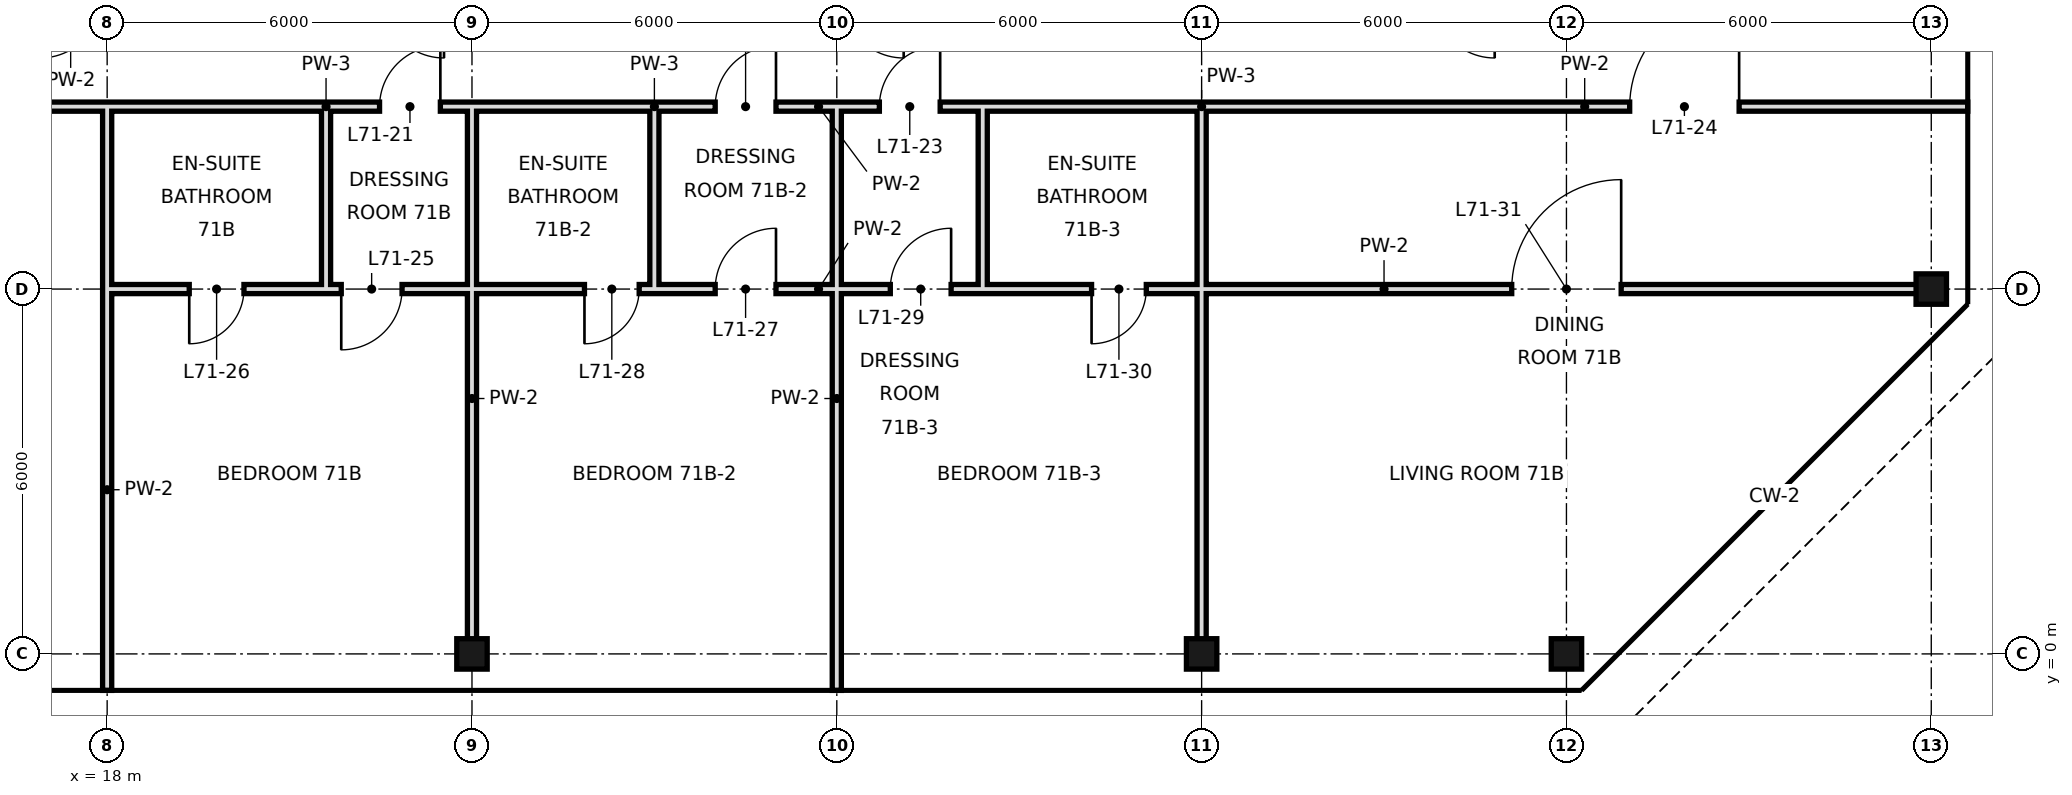
"""IFC4 building model, lengths in metres.
Left out: names, types, materials, properties, quantities, classifications, styles, units other than length and angle.
Written with IfcOpenShell. Run it as: python <this file> out.ifc"""

import sys

from ifc_helpers import new_model, si_unit, direction, frame, frame_2d, origin, origin_2d, place, context, subcontext, project, spatial, rectangle, hollow_rectangle, extrude, element, fill, save


model = new_model("IFC4")
c1 = context("Model", 3, precision=1e-05, world=origin(), true_north=direction((0.0, 1.0)))
c2 = subcontext(c1, "Body", "Model", "MODEL_VIEW")
j1 = project(units=[si_unit("LENGTHUNIT", "METRE"), si_unit("PLANEANGLEUNIT", "RADIAN")], contexts=[c1])
p1 = place(None, origin())
s1 = spatial("IfcSite", under=j1, at=p1, CompositionType="ELEMENT")
p2 = place(p1, origin())
s2 = spatial("IfcBuilding", under=s1, at=p2, CompositionType="ELEMENT")
p3 = place(p2, frame((0.0, 0.0, 301.6)))
s3 = spatial("IfcBuildingStorey", under=s2, at=p3, CompositionType="ELEMENT", Elevation=301.6)
for number, where, z_axis, x_axis in (
    (1, (24.0, 0.0, 0.0), (0.0, 0.0, 1.0), (1.0, 0.0, 0.0)),
    (2, (36.0, 0.0, 0.0), (0.0, 0.0, 1.0), (1.0, 0.0, 0.0)),
    (3, (42.0, 0.0, 0.0), (0.0, 0.0, 1.0), (1.0, 0.0, 0.0)),
    (4, (48.0, 6.0, 0.0), (0.0, 0.0, 1.0), (1.0, 0.0, 0.0)),
):
    element("IfcColumn", number, at=place(p3, frame(where, z_axis=z_axis, x_axis=x_axis)), inside=s3, PredefinedType="COLUMN", context=c2, shape_type="SweptSolid", body=[
        extrude(hollow_rectangle(XDim=0.5, YDim=0.5, WallThickness=0.025, at=origin_2d()), origin(), (0.0, 0.0, 1.0), 3.6),
    ])
p4 = place(p3, frame((18.0, -0.6, 0.0), z_axis=(0.0, 0.0, 1.0), x_axis=(0.0, 1.0, 0.0)))
e5 = element("IfcWall", 5, at=p4, inside=s3, PredefinedType="PARTITIONING", context=c2, shape_type="SweptSolid", body=[
    extrude(rectangle(XDim=6.6, YDim=0.15, at=frame_2d((3.3, 0.0))), origin(), (0.0, 0.0, 1.0), 2.72),
])
p5 = place(p3, frame((18.0, 6.0, 0.0), z_axis=(0.0, 0.0, 1.0), x_axis=(0.0, 1.0, 0.0)))
e6 = element("IfcWall", 6, at=p5, inside=s3, PredefinedType="PARTITIONING", context=c2, shape_type="SweptSolid", body=[
    extrude(rectangle(XDim=3.0, YDim=0.15, at=frame_2d((1.5, 0.0))), origin(), (0.0, 0.0, 1.0), 2.72),
])
p6 = place(p3, frame((21.6, 6.0, 0.0), z_axis=(0.0, 0.0, 1.0), x_axis=(0.0, 1.0, 0.0)))
e7 = element("IfcWall", 7, at=p6, inside=s3, PredefinedType="PARTITIONING", context=c2, shape_type="SweptSolid", body=[
    extrude(rectangle(XDim=3.0, YDim=0.15, at=frame_2d((1.5, 0.0))), origin(), (0.0, 0.0, 1.0), 3.42),
])
p7 = place(p3, frame((24.0, 0.0, 0.0), z_axis=(0.0, 0.0, 1.0), x_axis=(0.0, 1.0, 0.0)))
e8 = element("IfcWall", 8, at=p7, inside=s3, PredefinedType="PARTITIONING", context=c2, shape_type="SweptSolid", body=[
    extrude(rectangle(XDim=6.0, YDim=0.15, at=frame_2d((3.0, 0.0))), origin(), (0.0, 0.0, 1.0), 2.72),
])
p8 = place(p3, frame((24.0, 6.0, 0.0), z_axis=(0.0, 0.0, 1.0), x_axis=(0.0, 1.0, 0.0)))
e9 = element("IfcWall", 9, at=p8, inside=s3, PredefinedType="PARTITIONING", context=c2, shape_type="SweptSolid", body=[
    extrude(rectangle(XDim=3.0, YDim=0.15, at=frame_2d((1.5, 0.0))), origin(), (0.0, 0.0, 1.0), 2.72),
])
p9 = place(p3, frame((27.0, 6.0, 0.0), z_axis=(0.0, 0.0, 1.0), x_axis=(0.0, 1.0, 0.0)))
e10 = element("IfcWall", 10, at=p9, inside=s3, PredefinedType="PARTITIONING", context=c2, shape_type="SweptSolid", body=[
    extrude(rectangle(XDim=3.0, YDim=0.15, at=frame_2d((1.5, 0.0))), origin(), (0.0, 0.0, 1.0), 3.42),
])
p10 = place(p3, frame((30.0, -0.6, 0.0), z_axis=(0.0, 0.0, 1.0), x_axis=(0.0, 1.0, 0.0)))
e11 = element("IfcWall", 11, at=p10, inside=s3, PredefinedType="PARTITIONING", context=c2, shape_type="SweptSolid", body=[
    extrude(rectangle(XDim=9.6, YDim=0.15, at=frame_2d((4.8, 0.0))), origin(), (0.0, 0.0, 1.0), 2.72),
])
p11 = place(p3, frame((32.4, 6.0, 0.0), z_axis=(0.0, 0.0, 1.0), x_axis=(0.0, 1.0, 0.0)))
e12 = element("IfcWall", 12, at=p11, inside=s3, PredefinedType="PARTITIONING", context=c2, shape_type="SweptSolid", body=[
    extrude(rectangle(XDim=3.0, YDim=0.15, at=frame_2d((1.5, 0.0))), origin(), (0.0, 0.0, 1.0), 3.42),
])
p12 = place(p3, frame((36.0, 0.0, 0.0), z_axis=(0.0, 0.0, 1.0), x_axis=(0.0, 1.0, 0.0)))
e13 = element("IfcWall", 13, at=p12, inside=s3, PredefinedType="PARTITIONING", context=c2, shape_type="SweptSolid", body=[
    extrude(rectangle(XDim=6.0, YDim=0.15, at=frame_2d((3.0, 0.0))), origin(), (0.0, 0.0, 1.0), 2.72),
])
p13 = place(p3, frame((36.0, 6.0, 0.0), z_axis=(0.0, 0.0, 1.0), x_axis=(0.0, 1.0, 0.0)))
e14 = element("IfcWall", 14, at=p13, inside=s3, PredefinedType="PARTITIONING", context=c2, shape_type="SweptSolid", body=[
    extrude(rectangle(XDim=3.0, YDim=0.15, at=frame_2d((1.5, 0.0))), origin(), (0.0, 0.0, 1.0), 2.72),
])
p14 = place(p3, frame((21.6, 6.0, 0.0), z_axis=(0.0, 0.0, 1.0), x_axis=(1.0, 0.0, 0.0)))
e15 = element("IfcWall", 15, at=p14, inside=s3, PredefinedType="PARTITIONING", context=c2, shape_type="SweptSolid", body=[
    extrude(rectangle(XDim=2.4, YDim=0.15, at=frame_2d((1.2, 0.0))), origin(), (0.0, 0.0, 1.0), 2.97),
])
p15 = place(p14, frame((0.25, 0.0, 0.0)))
e16 = element("IfcOpeningElement", 16, at=p15, cuts=e15, PredefinedType="OPENING", context=c2, shape_type="SweptSolid", body=[
    extrude(rectangle(XDim=1.0, YDim=2.4, at=frame_2d((0.5, 1.2))), frame((0.0, 0.085, 0.0), z_axis=(0.0, -1.0, 0.0), x_axis=(1.0, 0.0, 0.0)), (0.0, 0.0, 1.0), 0.17),
])
p16 = place(p3, frame((27.0, 6.0, 0.0), z_axis=(0.0, 0.0, 1.0), x_axis=(1.0, 0.0, 0.0)))
e17 = element("IfcWall", 17, at=p16, inside=s3, PredefinedType="PARTITIONING", context=c2, shape_type="SweptSolid", body=[
    extrude(rectangle(XDim=5.4, YDim=0.15, at=frame_2d((2.7, 0.0))), origin(), (0.0, 0.0, 1.0), 2.97),
])
p17 = place(p16, frame((1.0, 0.0, 0.0)))
e18 = element("IfcOpeningElement", 18, at=p17, cuts=e17, PredefinedType="OPENING", context=c2, shape_type="SweptSolid", body=[
    extrude(rectangle(XDim=1.0, YDim=2.4, at=frame_2d((0.5, 1.2))), frame((0.0, 0.085, 0.0), z_axis=(0.0, -1.0, 0.0), x_axis=(1.0, 0.0, 0.0)), (0.0, 0.0, 1.0), 0.17),
])
p18 = place(p16, frame((3.88, 0.0, 0.0)))
e19 = element("IfcOpeningElement", 19, at=p18, cuts=e17, PredefinedType="OPENING", context=c2, shape_type="SweptSolid", body=[
    extrude(rectangle(XDim=1.0, YDim=2.4, at=frame_2d((0.5, 1.2))), frame((0.0, 0.085, 0.0), z_axis=(0.0, -1.0, 0.0), x_axis=(1.0, 0.0, 0.0)), (0.0, 0.0, 1.0), 0.17),
])
p19 = place(p3, frame((36.0, 6.0, 0.0), z_axis=(0.0, 0.0, 1.0), x_axis=(1.0, 0.0, 0.0)))
e20 = element("IfcWall", 20, at=p19, inside=s3, PredefinedType="PARTITIONING", context=c2, shape_type="SweptSolid", body=[
    extrude(rectangle(XDim=12.0, YDim=0.15, at=frame_2d((6.0, 0.0))), origin(), (0.0, 0.0, 1.0), 2.97),
])
p20 = place(p19, frame((5.1, 0.0, 0.0)))
e21 = element("IfcOpeningElement", 21, at=p20, cuts=e20, PredefinedType="OPENING", context=c2, shape_type="SweptSolid", body=[
    extrude(rectangle(XDim=1.8, YDim=2.4, at=frame_2d((0.9, 1.2))), frame((0.0, 0.085, 0.0), z_axis=(0.0, -1.0, 0.0), x_axis=(1.0, 0.0, 0.0)), (0.0, 0.0, 1.0), 0.17),
])
p21 = place(p3, frame((18.0, 6.0, 0.0), z_axis=(0.0, 0.0, 1.0), x_axis=(1.0, 0.0, 0.0)))
e22 = element("IfcWall", 22, at=p21, inside=s3, PredefinedType="PARTITIONING", context=c2, shape_type="SweptSolid", body=[
    extrude(rectangle(XDim=3.6, YDim=0.15, at=frame_2d((1.8, 0.0))), origin(), (0.0, 0.0, 1.0), 2.97),
])
p22 = place(p21, frame((1.35, 0.0, 0.0)))
e23 = element("IfcOpeningElement", 23, at=p22, cuts=e22, PredefinedType="OPENING", context=c2, shape_type="SweptSolid", body=[
    extrude(rectangle(XDim=0.9, YDim=2.4, at=frame_2d((0.45, 1.2))), frame((0.0, 0.085, 0.0), z_axis=(0.0, -1.0, 0.0), x_axis=(1.0, 0.0, 0.0)), (0.0, 0.0, 1.0), 0.17),
])
p23 = place(p3, frame((24.0, 6.0, 0.0), z_axis=(0.0, 0.0, 1.0), x_axis=(1.0, 0.0, 0.0)))
e24 = element("IfcWall", 24, at=p23, inside=s3, PredefinedType="PARTITIONING", context=c2, shape_type="SweptSolid", body=[
    extrude(rectangle(XDim=3.0, YDim=0.15, at=frame_2d((1.5, 0.0))), origin(), (0.0, 0.0, 1.0), 2.97),
])
p24 = place(p23, frame((1.85, 0.0, 0.0)))
e25 = element("IfcOpeningElement", 25, at=p24, cuts=e24, PredefinedType="OPENING", context=c2, shape_type="SweptSolid", body=[
    extrude(rectangle(XDim=0.9, YDim=2.4, at=frame_2d((0.45, 1.2))), frame((0.0, 0.085, 0.0), z_axis=(0.0, -1.0, 0.0), x_axis=(1.0, 0.0, 0.0)), (0.0, 0.0, 1.0), 0.17),
])
p25 = place(p3, frame((32.4, 6.0, 0.0), z_axis=(0.0, 0.0, 1.0), x_axis=(1.0, 0.0, 0.0)))
e26 = element("IfcWall", 26, at=p25, inside=s3, PredefinedType="PARTITIONING", context=c2, shape_type="SweptSolid", body=[
    extrude(rectangle(XDim=3.6, YDim=0.15, at=frame_2d((1.8, 0.0))), origin(), (0.0, 0.0, 1.0), 2.97),
])
p26 = place(p25, frame((1.79, 0.0, 0.0)))
e27 = element("IfcOpeningElement", 27, at=p26, cuts=e26, PredefinedType="OPENING", context=c2, shape_type="SweptSolid", body=[
    extrude(rectangle(XDim=0.9, YDim=2.4, at=frame_2d((0.45, 1.2))), frame((0.0, 0.085, 0.0), z_axis=(0.0, -1.0, 0.0), x_axis=(1.0, 0.0, 0.0)), (0.0, 0.0, 1.0), 0.17),
])
p27 = place(p3, frame((8.4, 9.0, 0.0), z_axis=(0.0, 0.0, 1.0), x_axis=(1.0, 0.0, 0.0)))
e28 = element("IfcWall", 28, at=p27, inside=s3, PredefinedType="PARTITIONING", context=c2, shape_type="SweptSolid", body=[
    extrude(rectangle(XDim=9.6, YDim=0.15, at=frame_2d((4.8, 0.0))), origin(), (0.0, 0.0, 1.0), 3.42),
])
p28 = place(p27, frame((1.72, 0.0, 0.0)))
e29 = element("IfcOpeningElement", 29, at=p28, cuts=e28, PredefinedType="OPENING", context=c2, shape_type="SweptSolid", body=[
    extrude(rectangle(XDim=1.0, YDim=2.4, at=frame_2d((0.5, 1.2))), frame((0.0, 0.085, 0.0), z_axis=(0.0, -1.0, 0.0), x_axis=(1.0, 0.0, 0.0)), (0.0, 0.0, 1.0), 0.17),
])
p29 = place(p27, frame((5.2, 0.0, 0.0)))
e30 = element("IfcOpeningElement", 30, at=p29, cuts=e28, PredefinedType="OPENING", context=c2, shape_type="SweptSolid", body=[
    extrude(rectangle(XDim=1.0, YDim=2.4, at=frame_2d((0.5, 1.2))), frame((0.0, 0.085, 0.0), z_axis=(0.0, -1.0, 0.0), x_axis=(1.0, 0.0, 0.0)), (0.0, 0.0, 1.0), 0.17),
])
p30 = place(p3, frame((21.6, 9.0, 0.0), z_axis=(0.0, 0.0, 1.0), x_axis=(1.0, 0.0, 0.0)))
e31 = element("IfcWall", 31, at=p30, inside=s3, PredefinedType="PARTITIONING", context=c2, shape_type="SweptSolid", body=[
    extrude(rectangle(XDim=2.4, YDim=0.15, at=frame_2d((1.2, 0.0))), origin(), (0.0, 0.0, 1.0), 3.42),
])
p31 = place(p30, frame((0.88, 0.0, 0.0)))
e32 = element("IfcOpeningElement", 32, at=p31, cuts=e31, PredefinedType="OPENING", context=c2, shape_type="SweptSolid", body=[
    extrude(rectangle(XDim=1.0, YDim=2.4, at=frame_2d((0.5, 1.2))), frame((0.0, 0.085, 0.0), z_axis=(0.0, -1.0, 0.0), x_axis=(1.0, 0.0, 0.0)), (0.0, 0.0, 1.0), 0.17),
])
p32 = place(p3, frame((27.0, 9.0, 0.0), z_axis=(0.0, 0.0, 1.0), x_axis=(1.0, 0.0, 0.0)))
e33 = element("IfcWall", 33, at=p32, inside=s3, PredefinedType="PARTITIONING", context=c2, shape_type="SweptSolid", body=[
    extrude(rectangle(XDim=5.4, YDim=0.15, at=frame_2d((2.7, 0.0))), origin(), (0.0, 0.0, 1.0), 3.42),
])
p33 = place(p32, frame((1.0, 0.0, 0.0)))
e34 = element("IfcOpeningElement", 34, at=p33, cuts=e33, PredefinedType="OPENING", context=c2, shape_type="SweptSolid", body=[
    extrude(rectangle(XDim=1.0, YDim=2.4, at=frame_2d((0.5, 1.2))), frame((0.0, 0.085, 0.0), z_axis=(0.0, -1.0, 0.0), x_axis=(1.0, 0.0, 0.0)), (0.0, 0.0, 1.0), 0.17),
])
p34 = place(p32, frame((3.7, 0.0, 0.0)))
e35 = element("IfcOpeningElement", 35, at=p34, cuts=e33, PredefinedType="OPENING", context=c2, shape_type="SweptSolid", body=[
    extrude(rectangle(XDim=1.0, YDim=2.4, at=frame_2d((0.5, 1.2))), frame((0.0, 0.085, 0.0), z_axis=(0.0, -1.0, 0.0), x_axis=(1.0, 0.0, 0.0)), (0.0, 0.0, 1.0), 0.17),
])
p35 = place(p3, frame((36.0, 9.0, 0.0), z_axis=(0.0, 0.0, 1.0), x_axis=(1.0, 0.0, 0.0)))
e36 = element("IfcWall", 36, at=p35, inside=s3, PredefinedType="PARTITIONING", context=c2, shape_type="SweptSolid", body=[
    extrude(rectangle(XDim=12.6, YDim=0.15, at=frame_2d((6.3, 0.0))), origin(), (0.0, 0.0, 1.0), 3.42),
])
p36 = place(p35, frame((7.04, 0.0, 0.0)))
e37 = element("IfcOpeningElement", 37, at=p36, cuts=e36, PredefinedType="OPENING", context=c2, shape_type="SweptSolid", body=[
    extrude(rectangle(XDim=1.8, YDim=2.4, at=frame_2d((0.9, 1.2))), frame((0.0, 0.085, 0.0), z_axis=(0.0, -1.0, 0.0), x_axis=(1.0, 0.0, 0.0)), (0.0, 0.0, 1.0), 0.17),
])
p37 = place(p3, frame((18.0, 9.0, 0.0), z_axis=(0.0, 0.0, 1.0), x_axis=(1.0, 0.0, 0.0)))
e38 = element("IfcWall", 38, at=p37, inside=s3, PredefinedType="PARTITIONING", context=c2, shape_type="SweptSolid", body=[
    extrude(rectangle(XDim=3.6, YDim=0.15, at=frame_2d((1.8, 0.0))), origin(), (0.0, 0.0, 1.0), 3.42),
])
p38 = place(p3, frame((24.0, 9.0, 0.0), z_axis=(0.0, 0.0, 1.0), x_axis=(1.0, 0.0, 0.0)))
e39 = element("IfcWall", 39, at=p38, inside=s3, PredefinedType="PARTITIONING", context=c2, shape_type="SweptSolid", body=[
    extrude(rectangle(XDim=3.0, YDim=0.15, at=frame_2d((1.5, 0.0))), origin(), (0.0, 0.0, 1.0), 3.42),
])
p39 = place(p3, frame((32.4, 9.0, 0.0), z_axis=(0.0, 0.0, 1.0), x_axis=(1.0, 0.0, 0.0)))
e40 = element("IfcWall", 40, at=p39, inside=s3, PredefinedType="PARTITIONING", context=c2, shape_type="SweptSolid", body=[
    extrude(rectangle(XDim=3.6, YDim=0.15, at=frame_2d((1.8, 0.0))), origin(), (0.0, 0.0, 1.0), 3.42),
])
p40 = place(p31, frame((1.0, 0.0, 0.0), z_axis=(0.0, 0.0, 1.0), x_axis=(-1.0, 0.0, 0.0)))
e41 = element("IfcDoor", 41, at=p40, inside=s3, OperationType="SINGLE_SWING_LEFT", PredefinedType="DOOR", context=c2, shape_type="SweptSolid", body=[
    extrude(rectangle(XDim=1.0, YDim=2.4, at=frame_2d((0.5, 1.2))), frame((0.0, 0.025, 0.0), z_axis=(0.0, -1.0, 0.0), x_axis=(1.0, 0.0, 0.0)), (0.0, 0.0, 1.0), 0.05),
])
fill(e32, e41)
p41 = place(p33, frame((1.0, 0.0, 0.0), z_axis=(0.0, 0.0, 1.0), x_axis=(-1.0, 0.0, 0.0)))
e42 = element("IfcDoor", 42, at=p41, inside=s3, OperationType="SINGLE_SWING_LEFT", PredefinedType="DOOR", context=c2, shape_type="SweptSolid", body=[
    extrude(rectangle(XDim=1.0, YDim=2.4, at=frame_2d((0.5, 1.2))), frame((0.0, 0.025, 0.0), z_axis=(0.0, -1.0, 0.0), x_axis=(1.0, 0.0, 0.0)), (0.0, 0.0, 1.0), 0.05),
])
fill(e34, e42)
p42 = place(p34, frame((1.0, 0.0, 0.0), z_axis=(0.0, 0.0, 1.0), x_axis=(-1.0, 0.0, 0.0)))
e43 = element("IfcDoor", 43, at=p42, inside=s3, OperationType="SINGLE_SWING_LEFT", PredefinedType="DOOR", context=c2, shape_type="SweptSolid", body=[
    extrude(rectangle(XDim=1.0, YDim=2.4, at=frame_2d((0.5, 1.2))), frame((0.0, 0.025, 0.0), z_axis=(0.0, -1.0, 0.0), x_axis=(1.0, 0.0, 0.0)), (0.0, 0.0, 1.0), 0.05),
])
fill(e35, e43)
p43 = place(p36, frame((1.8, 0.0, 0.0), z_axis=(0.0, 0.0, 1.0), x_axis=(-1.0, 0.0, 0.0)))
e44 = element("IfcDoor", 44, at=p43, inside=s3, OperationType="SINGLE_SWING_LEFT", PredefinedType="DOOR", context=c2, shape_type="SweptSolid", body=[
    extrude(rectangle(XDim=1.8, YDim=2.4, at=frame_2d((0.9, 1.2))), frame((0.0, 0.025, 0.0), z_axis=(0.0, -1.0, 0.0), x_axis=(1.0, 0.0, 0.0)), (0.0, 0.0, 1.0), 0.05),
])
fill(e37, e44)
p44 = place(p15, frame((1.0, 0.0, 0.0), z_axis=(0.0, 0.0, 1.0), x_axis=(-1.0, 0.0, 0.0)))
e45 = element("IfcDoor", 45, at=p44, inside=s3, OperationType="SINGLE_SWING_RIGHT", PredefinedType="DOOR", context=c2, shape_type="SweptSolid", body=[
    extrude(rectangle(XDim=1.0, YDim=2.4, at=frame_2d((0.5, 1.2))), frame((0.0, 0.025, 0.0), z_axis=(0.0, -1.0, 0.0), x_axis=(1.0, 0.0, 0.0)), (0.0, 0.0, 1.0), 0.05),
])
fill(e16, e45)
p45 = place(p22, frame((0.9, 0.0, 0.0), z_axis=(0.0, 0.0, 1.0), x_axis=(-1.0, 0.0, 0.0)))
e46 = element("IfcDoor", 46, at=p45, inside=s3, OperationType="SINGLE_SWING_RIGHT", PredefinedType="DOOR", context=c2, shape_type="SweptSolid", body=[
    extrude(rectangle(XDim=0.9, YDim=2.4, at=frame_2d((0.45, 1.2))), frame((0.0, 0.025, 0.0), z_axis=(0.0, -1.0, 0.0), x_axis=(1.0, 0.0, 0.0)), (0.0, 0.0, 1.0), 0.05),
])
fill(e23, e46)
p46 = place(p17, frame((1.0, 0.0, 0.0), z_axis=(0.0, 0.0, 1.0), x_axis=(-1.0, 0.0, 0.0)))
e47 = element("IfcDoor", 47, at=p46, inside=s3, OperationType="SINGLE_SWING_LEFT", PredefinedType="DOOR", context=c2, shape_type="SweptSolid", body=[
    extrude(rectangle(XDim=1.0, YDim=2.4, at=frame_2d((0.5, 1.2))), frame((0.0, 0.025, 0.0), z_axis=(0.0, -1.0, 0.0), x_axis=(1.0, 0.0, 0.0)), (0.0, 0.0, 1.0), 0.05),
])
fill(e18, e47)
p47 = place(p24, frame((0.9, 0.0, 0.0), z_axis=(0.0, 0.0, 1.0), x_axis=(-1.0, 0.0, 0.0)))
e48 = element("IfcDoor", 48, at=p47, inside=s3, OperationType="SINGLE_SWING_RIGHT", PredefinedType="DOOR", context=c2, shape_type="SweptSolid", body=[
    extrude(rectangle(XDim=0.9, YDim=2.4, at=frame_2d((0.45, 1.2))), frame((0.0, 0.025, 0.0), z_axis=(0.0, -1.0, 0.0), x_axis=(1.0, 0.0, 0.0)), (0.0, 0.0, 1.0), 0.05),
])
fill(e25, e48)
p48 = place(p18, frame((1.0, 0.0, 0.0), z_axis=(0.0, 0.0, 1.0), x_axis=(-1.0, 0.0, 0.0)))
e49 = element("IfcDoor", 49, at=p48, inside=s3, OperationType="SINGLE_SWING_LEFT", PredefinedType="DOOR", context=c2, shape_type="SweptSolid", body=[
    extrude(rectangle(XDim=1.0, YDim=2.4, at=frame_2d((0.5, 1.2))), frame((0.0, 0.025, 0.0), z_axis=(0.0, -1.0, 0.0), x_axis=(1.0, 0.0, 0.0)), (0.0, 0.0, 1.0), 0.05),
])
fill(e19, e49)
p49 = place(p26, frame((0.9, 0.0, 0.0), z_axis=(0.0, 0.0, 1.0), x_axis=(-1.0, 0.0, 0.0)))
e50 = element("IfcDoor", 50, at=p49, inside=s3, OperationType="SINGLE_SWING_RIGHT", PredefinedType="DOOR", context=c2, shape_type="SweptSolid", body=[
    extrude(rectangle(XDim=0.9, YDim=2.4, at=frame_2d((0.45, 1.2))), frame((0.0, 0.025, 0.0), z_axis=(0.0, -1.0, 0.0), x_axis=(1.0, 0.0, 0.0)), (0.0, 0.0, 1.0), 0.05),
])
fill(e27, e50)
p50 = place(p20, frame((1.8, 0.0, 0.0), z_axis=(0.0, 0.0, 1.0), x_axis=(-1.0, 0.0, 0.0)))
e51 = element("IfcDoor", 51, at=p50, inside=s3, OperationType="SINGLE_SWING_LEFT", PredefinedType="DOOR", context=c2, shape_type="SweptSolid", body=[
    extrude(rectangle(XDim=1.8, YDim=2.4, at=frame_2d((0.9, 1.2))), frame((0.0, 0.025, 0.0), z_axis=(0.0, -1.0, 0.0), x_axis=(1.0, 0.0, 0.0)), (0.0, 0.0, 1.0), 0.05),
])
fill(e21, e51)
save(model, sys.argv[1])
